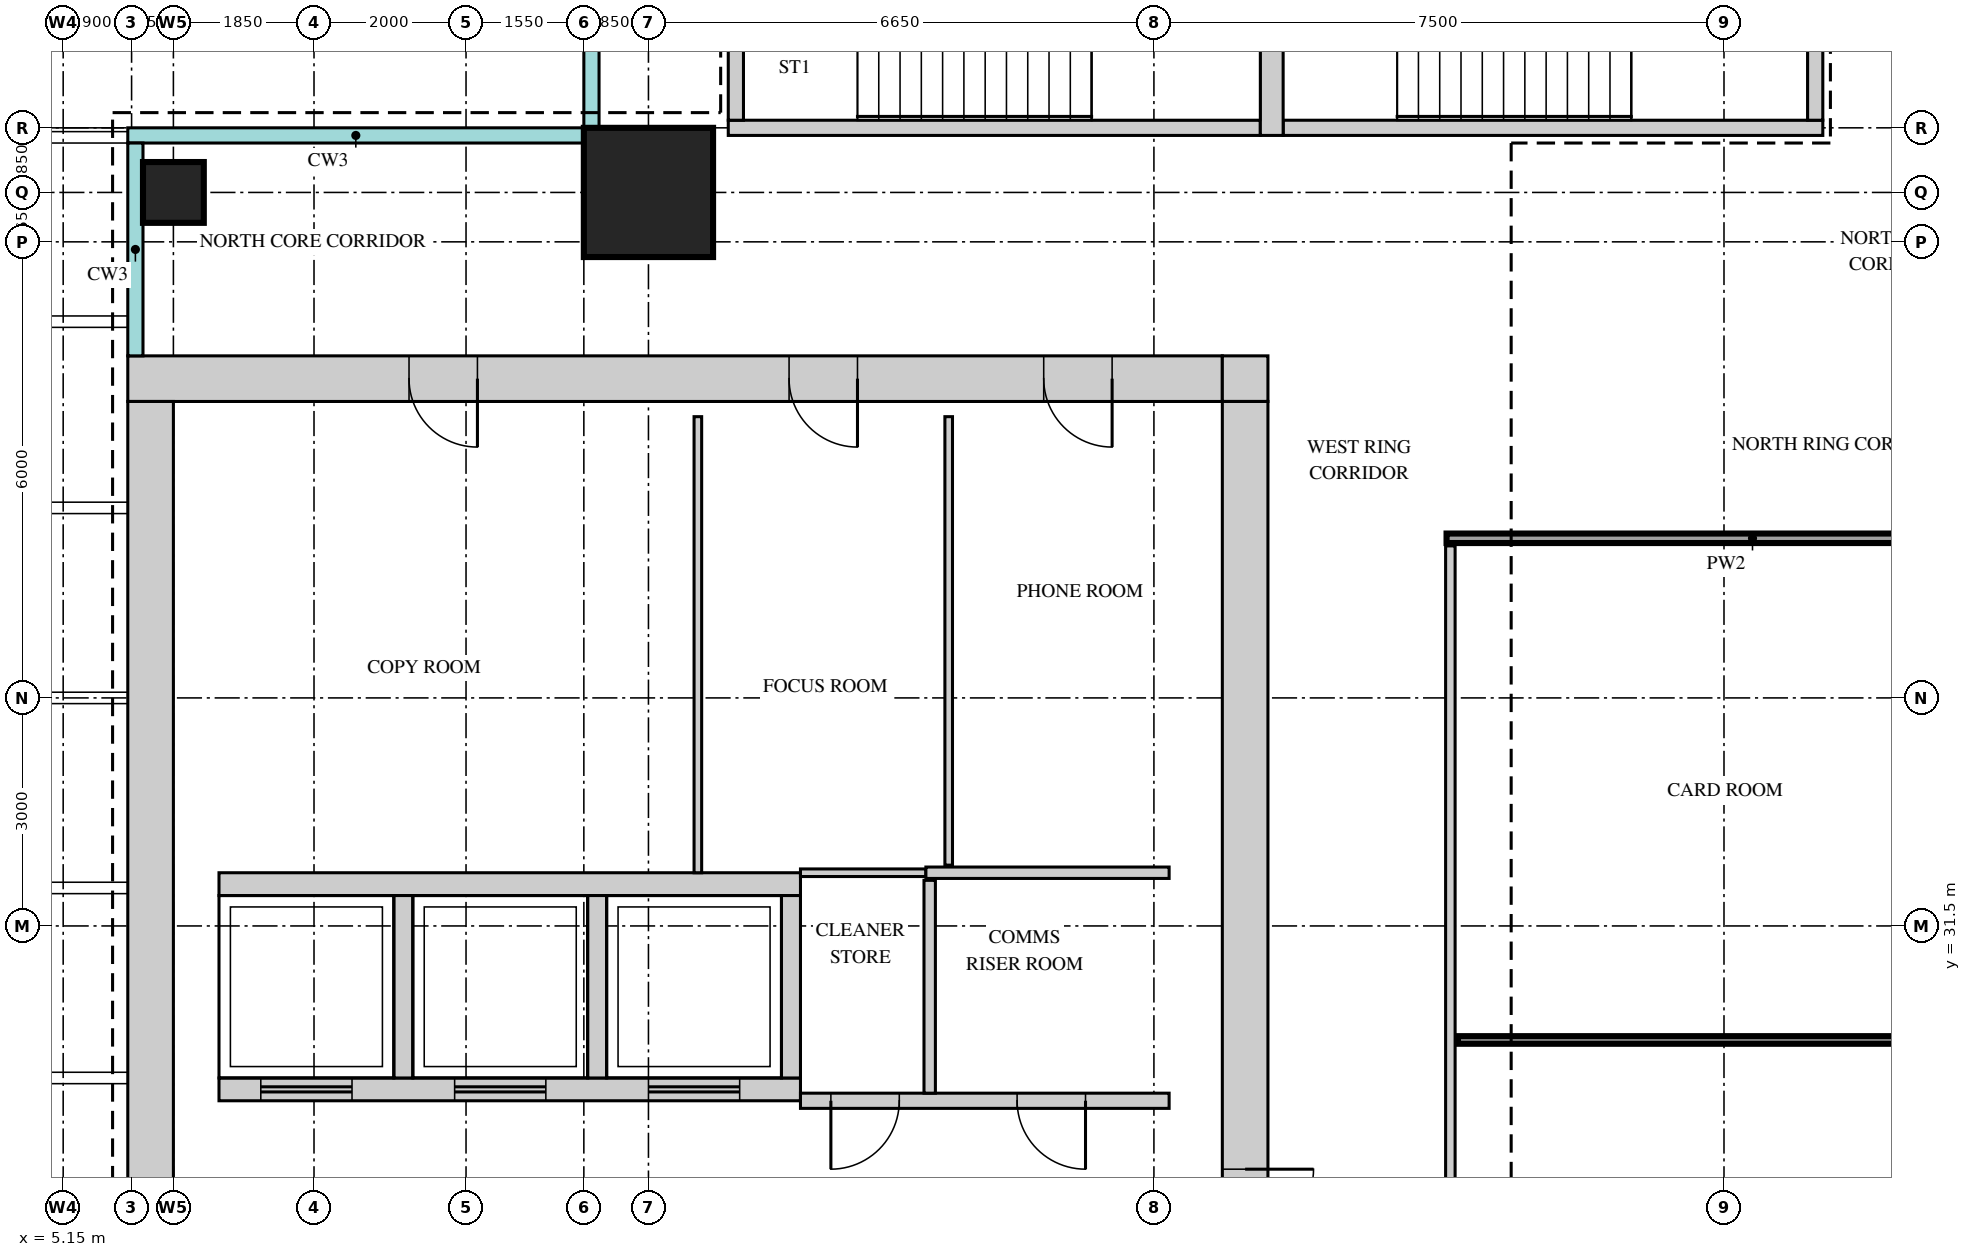
"""IFC4 building model, lengths in metres.
Left out: names, types, materials, properties, quantities, classifications, styles, units other than length and angle.
Written with IfcOpenShell. Run it as: python <this file> out.ifc"""

import sys

from ifc_helpers import new_model, si_unit, direction, frame, frame_2d, origin, origin_2d, place, context, subcontext, project, spatial, rectangle, extrude, source, transform, mapped, element, fill, save


model = new_model("IFC4")
c1 = context("Model", 3, precision=1e-05, world=origin(), true_north=direction((0.0, 1.0)))
c2 = subcontext(c1, "Body", "Model", "MODEL_VIEW")
j1 = project(units=[si_unit("LENGTHUNIT", "METRE"), si_unit("PLANEANGLEUNIT", "RADIAN")], contexts=[c1])
p1 = place(None, origin())
s1 = spatial("IfcSite", under=j1, at=p1, CompositionType="ELEMENT")
p2 = place(p1, origin())
s2 = spatial("IfcBuilding", under=s1, at=p2, CompositionType="ELEMENT")
p3 = place(p2, frame((0.0, 0.0, 294.2)))
s3 = spatial("IfcBuildingStorey", under=s2, at=p3, CompositionType="ELEMENT", Elevation=294.2)
m1 = source(origin(), c2, "Body", "SweptSolid", [
    extrude(rectangle(XDim=14.4, YDim=0.6, at=frame_2d((7.2, 0.0))), origin(), (0.0, 0.0, 1.0), 3.75),
])
p4 = place(p3, frame((6.0, 38.7, 0.0), z_axis=(0.0, 0.0, 1.0), x_axis=(1.0, 0.0, 0.0)))
e1 = element("IfcWall", 1, at=p4, inside=s3, PredefinedType="SHEAR", context=c2, shape_type="MappedRepresentation", body=[
    mapped(m1, transform((0.0, 0.0, 0.0))),
])
m2 = source(origin(), c2, "Body", "SweptSolid", [
    extrude(rectangle(XDim=0.9, YDim=2.1, at=frame_2d((0.45, 1.05))), frame((0.0, 0.31, 0.0), z_axis=(0.0, -1.0, 0.0), x_axis=(1.0, 0.0, 0.0)), (0.0, 0.0, 1.0), 0.62),
])
p5 = place(p4, frame((3.7, 0.0, 0.0)))
e2 = element("IfcOpeningElement", 2, at=p5, cuts=e1, PredefinedType="OPENING", context=c2, shape_type="MappedRepresentation", body=[
    mapped(m2, transform((0.0, 0.0, 0.0))),
])
p6 = place(p4, frame((8.7, 0.0, 0.0)))
e3 = element("IfcOpeningElement", 3, at=p6, cuts=e1, PredefinedType="OPENING", context=c2, shape_type="MappedRepresentation", body=[
    mapped(m2, transform((0.0, 0.0, 0.0))),
])
p7 = place(p4, frame((12.05, 0.0, 0.0)))
e4 = element("IfcOpeningElement", 4, at=p7, cuts=e1, PredefinedType="OPENING", context=c2, shape_type="MappedRepresentation", body=[
    mapped(m2, transform((0.0, 0.0, 0.0))),
])
m3 = source(origin(), c2, "Body", "SweptSolid", [
    extrude(rectangle(XDim=0.6, YDim=0.6, at=frame_2d((0.3, 0.0))), origin(), (0.0, 0.0, 1.0), 3.75),
])
p8 = place(p3, frame((20.4, 38.7, 0.0), z_axis=(0.0, 0.0, 1.0), x_axis=(1.0, 0.0, 0.0)))
e5 = element("IfcWall", 5, at=p8, inside=s3, PredefinedType="SHEAR", context=c2, shape_type="MappedRepresentation", body=[
    mapped(m3, transform((0.0, 0.0, 0.0))),
])
m4 = source(origin(), c2, "Body", "SweptSolid", [
    extrude(rectangle(XDim=22.8, YDim=0.6, at=frame_2d((11.4, 0.0))), origin(), (0.0, 0.0, 1.0), 3.75),
])
p9 = place(p3, frame((20.7, 15.6, 0.0), z_axis=(0.0, 0.0, 1.0), x_axis=(0.0, 1.0, 0.0)))
e6 = element("IfcWall", 6, at=p9, inside=s3, PredefinedType="SHEAR", context=c2, shape_type="MappedRepresentation", body=[
    mapped(m4, transform((0.0, 0.0, 0.0))),
])
m5 = source(origin(), c2, "Body", "SweptSolid", [
    extrude(rectangle(XDim=1.8, YDim=2.1, at=frame_2d((0.9, 1.05))), frame((0.0, 0.31, 0.0), z_axis=(0.0, -1.0, 0.0), x_axis=(1.0, 0.0, 0.0)), (0.0, 0.0, 1.0), 0.62),
])
p10 = place(p9, frame((10.9, 0.0, 0.0)))
e7 = element("IfcOpeningElement", 7, at=p10, cuts=e6, PredefinedType="OPENING", context=c2, shape_type="MappedRepresentation", body=[
    mapped(m5, transform((0.0, 0.0, 0.0))),
])
p11 = place(p9, frame((0.55, 0.0, 0.0)))
e8 = element("IfcOpeningElement", 8, at=p11, cuts=e6, PredefinedType="OPENING", context=c2, shape_type="MappedRepresentation", body=[
    mapped(m2, transform((0.0, 0.0, 0.0))),
])
p12 = place(p9, frame((4.1, 0.0, 0.0)))
e9 = element("IfcOpeningElement", 9, at=p12, cuts=e6, PredefinedType="OPENING", context=c2, shape_type="MappedRepresentation", body=[
    mapped(m2, transform((0.0, 0.0, 0.0))),
])
p13 = place(p3, frame((6.3, 15.6, 0.0), z_axis=(0.0, 0.0, 1.0), x_axis=(0.0, 1.0, 0.0)))
e10 = element("IfcWall", 10, at=p13, inside=s3, PredefinedType="SHEAR", context=c2, shape_type="MappedRepresentation", body=[
    mapped(m4, transform((0.0, 0.0, 0.0))),
])
m6 = source(origin(), c2, "Body", "SweptSolid", [
    extrude(rectangle(XDim=7.0, YDim=0.2, at=frame_2d((3.5, 0.0))), origin(), (0.0, 0.0, 1.0), 3.75),
])
p14 = place(p3, frame((13.9, 42.0, 0.0), z_axis=(0.0, 0.0, 1.0), x_axis=(1.0, 0.0, 0.0)))
e11 = element("IfcWall", 11, at=p14, inside=s3, PredefinedType="SHEAR", context=c2, shape_type="MappedRepresentation", body=[
    mapped(m6, transform((0.0, 0.0, 0.0))),
])
m7 = source(origin(), c2, "Body", "SweptSolid", [
    extrude(rectangle(XDim=7.1, YDim=0.2, at=frame_2d((3.55, 0.0))), origin(), (0.0, 0.0, 1.0), 3.75),
])
p15 = place(p3, frame((21.2, 42.0, 0.0), z_axis=(0.0, 0.0, 1.0), x_axis=(1.0, 0.0, 0.0)))
e12 = element("IfcWall", 12, at=p15, inside=s3, PredefinedType="SHEAR", context=c2, shape_type="MappedRepresentation", body=[
    mapped(m7, transform((0.0, 0.0, 0.0))),
])
m8 = source(origin(), c2, "Body", "SweptSolid", [
    extrude(rectangle(XDim=3.75, YDim=0.3, at=frame_2d((1.875, 0.0))), origin(), (0.0, 0.0, 1.0), 3.75),
])
p16 = place(p3, frame((21.05, 41.9, 0.0), z_axis=(0.0, 0.0, 1.0), x_axis=(0.0, 1.0, 0.0)))
e13 = element("IfcWall", 13, at=p16, inside=s3, PredefinedType="SHEAR", context=c2, shape_type="MappedRepresentation", body=[
    mapped(m8, transform((0.0, 0.0, 0.0))),
])
m9 = source(origin(), c2, "Body", "SweptSolid", [
    extrude(rectangle(XDim=3.35, YDim=0.2, at=frame_2d((1.675, 0.0))), origin(), (0.0, 0.0, 1.0), 3.75),
])
for number, where, z_axis, x_axis in (
    (14, (14.0, 42.1, 0.0), (0.0, 0.0, 1.0), (0.0, 1.0, 0.0)),
    (15, (28.2, 42.1, 0.0), (0.0, 0.0, 1.0), (0.0, 1.0, 0.0)),
):
    element("IfcWall", number, at=place(p3, frame(where, z_axis=z_axis, x_axis=x_axis)), inside=s3, PredefinedType="SHEAR", context=c2, shape_type="MappedRepresentation", body=[
        mapped(m9, transform((0.0, 0.0, 0.0))),
    ])
m10 = source(origin(), c2, "Body", "SweptSolid", [
    extrude(rectangle(XDim=7.65, YDim=0.3, at=frame_2d((3.825, 0.0))), origin(), (0.0, 0.0, 1.0), 3.75),
])
p17 = place(p3, frame((7.2, 32.05, 0.0), z_axis=(0.0, 0.0, 1.0), x_axis=(1.0, 0.0, 0.0)))
e16 = element("IfcWall", 16, at=p17, inside=s3, PredefinedType="STANDARD", context=c2, shape_type="MappedRepresentation", body=[
    mapped(m10, transform((0.0, 0.0, 0.0))),
])
p18 = place(p3, frame((7.2, 29.35, 0.0), z_axis=(0.0, 0.0, 1.0), x_axis=(1.0, 0.0, 0.0)))
e17 = element("IfcWall", 17, at=p18, inside=s3, PredefinedType="STANDARD", context=c2, shape_type="MappedRepresentation", body=[
    mapped(m10, transform((0.0, 0.0, 0.0))),
])
m11 = source(origin(), c2, "Body", "SweptSolid", [
    extrude(rectangle(XDim=1.2, YDim=2.1, at=frame_2d((0.6, 1.05))), frame((0.0, 0.16, 0.0), z_axis=(0.0, -1.0, 0.0), x_axis=(1.0, 0.0, 0.0)), (0.0, 0.0, 1.0), 0.32),
])
p19 = place(p18, frame((0.55, 0.0, 0.0)))
e18 = element("IfcOpeningElement", 18, at=p19, cuts=e17, PredefinedType="OPENING", context=c2, shape_type="MappedRepresentation", body=[
    mapped(m11, transform((0.0, 0.0, 0.0))),
])
p20 = place(p18, frame((3.1, 0.0, 0.0)))
e19 = element("IfcOpeningElement", 19, at=p20, cuts=e17, PredefinedType="OPENING", context=c2, shape_type="MappedRepresentation", body=[
    mapped(m11, transform((0.0, 0.0, 0.0))),
])
p21 = place(p18, frame((5.65, 0.0, 0.0)))
e20 = element("IfcOpeningElement", 20, at=p21, cuts=e17, PredefinedType="OPENING", context=c2, shape_type="MappedRepresentation", body=[
    mapped(m11, transform((0.0, 0.0, 0.0))),
])
m12 = source(origin(), c2, "Body", "SweptSolid", [
    extrude(rectangle(XDim=2.4, YDim=0.25, at=frame_2d((1.2, 0.0))), origin(), (0.0, 0.0, 1.0), 3.75),
])
for number, where, z_axis, x_axis in (
    (21, (9.625, 29.5, 0.0), (0.0, 0.0, 1.0), (0.0, 1.0, 0.0)),
    (22, (12.175, 29.5, 0.0), (0.0, 0.0, 1.0), (0.0, 1.0, 0.0)),
    (23, (14.725, 29.5, 0.0), (0.0, 0.0, 1.0), (0.0, 1.0, 0.0)),
):
    element("IfcWall", number, at=place(p3, frame(where, z_axis=z_axis, x_axis=x_axis)), inside=s3, PredefinedType="STANDARD", context=c2, shape_type="MappedRepresentation", body=[
        mapped(m12, transform((0.0, 0.0, 0.0))),
    ])
m13 = source(origin(), c2, "Body", "SweptSolid", [
    extrude(rectangle(XDim=1.7, YDim=1.7, at=origin_2d()), origin(), (0.0, 0.0, 1.0), 3.75),
])
p22 = place(p3, frame((12.85, 41.15, 0.0), z_axis=(0.0, 0.0, 1.0), x_axis=(1.0, 0.0, 0.0)))
e24 = element("IfcColumn", 24, at=p22, inside=s3, PredefinedType="COLUMN", context=c2, shape_type="MappedRepresentation", body=[
    mapped(m13, transform((0.0, 0.0, 0.0))),
])
m14 = source(origin(), c2, "Body", "SweptSolid", [
    extrude(rectangle(XDim=0.8, YDim=0.8, at=origin_2d()), origin(), (0.0, 0.0, 1.0), 3.75),
])
p23 = place(p3, frame((6.6, 41.15, 0.0), z_axis=(0.0, 0.0, 1.0), x_axis=(1.0, 0.0, 0.0)))
e25 = element("IfcColumn", 25, at=p23, inside=s3, PredefinedType="COLUMN", context=c2, shape_type="MappedRepresentation", body=[
    mapped(m14, transform((0.0, 0.0, 0.0))),
])
m15 = source(origin(), c2, "Body", "SweptSolid", [
    extrude(rectangle(XDim=19.0, YDim=0.125, at=frame_2d((9.5, 0.0))), origin(), (0.0, 0.0, 1.0), 3.8),
])
p24 = place(p3, frame((23.4, 17.5, 0.0), z_axis=(0.0, 0.0, 1.0), x_axis=(0.0, 1.0, 0.0)))
e26 = element("IfcWall", 26, at=p24, inside=s3, PredefinedType="PARTITIONING", context=c2, shape_type="MappedRepresentation", body=[
    mapped(m15, transform((0.0, 0.0, 0.0))),
])
m16 = source(origin(), c2, "Body", "SweptSolid", [
    extrude(rectangle(XDim=0.9, YDim=2.1, at=frame_2d((0.45, 1.05))), frame((0.0, 0.073, 0.0), z_axis=(0.0, -1.0, 0.0), x_axis=(1.0, 0.0, 0.0)), (0.0, 0.0, 1.0), 0.145),
])
p25 = place(p24, frame((8.4, 0.0, 0.0)))
e27 = element("IfcOpeningElement", 27, at=p25, cuts=e26, PredefinedType="OPENING", context=c2, shape_type="MappedRepresentation", body=[
    mapped(m16, transform((0.0, 0.0, 0.0))),
])
m17 = source(origin(), c2, "Body", "SweptSolid", [
    extrude(rectangle(XDim=4.85, YDim=0.2, at=frame_2d((2.425, 0.0))), origin(), (0.0, 0.0, 1.0), 3.8),
])
p26 = place(p3, frame((14.85, 29.2, 0.0), z_axis=(0.0, 0.0, 1.0), x_axis=(1.0, 0.0, 0.0)))
e28 = element("IfcWall", 28, at=p26, inside=s3, PredefinedType="PARTITIONING", context=c2, shape_type="MappedRepresentation", body=[
    mapped(m17, transform((0.0, 0.0, 0.0))),
])
m18 = source(origin(), c2, "Body", "SweptSolid", [
    extrude(rectangle(XDim=0.9, YDim=2.1, at=frame_2d((0.45, 1.05))), frame((0.0, 0.11, 0.0), z_axis=(0.0, -1.0, 0.0), x_axis=(1.0, 0.0, 0.0)), (0.0, 0.0, 1.0), 0.22),
])
p27 = place(p26, frame((0.4, 0.0, 0.0)))
e29 = element("IfcOpeningElement", 29, at=p27, cuts=e28, PredefinedType="OPENING", context=c2, shape_type="MappedRepresentation", body=[
    mapped(m18, transform((0.0, 0.0, 0.0))),
])
p28 = place(p26, frame((2.85, 0.0, 0.0)))
e30 = element("IfcOpeningElement", 30, at=p28, cuts=e28, PredefinedType="OPENING", context=c2, shape_type="MappedRepresentation", body=[
    mapped(m18, transform((0.0, 0.0, 0.0))),
])
m19 = source(origin(), c2, "Body", "SweptSolid", [
    extrude(rectangle(XDim=2.8, YDim=0.15, at=frame_2d((1.4, 0.0))), origin(), (0.0, 0.0, 1.0), 3.8),
])
p29 = place(p3, frame((16.55, 29.3, 0.0), z_axis=(0.0, 0.0, 1.0), x_axis=(0.0, 1.0, 0.0)))
e31 = element("IfcWall", 31, at=p29, inside=s3, PredefinedType="PARTITIONING", context=c2, shape_type="MappedRepresentation", body=[
    mapped(m19, transform((0.0, 0.0, 0.0))),
])
m20 = source(origin(), c2, "Body", "SweptSolid", [
    extrude(rectangle(XDim=16.4, YDim=0.1, at=frame_2d((8.2, 0.0))), origin(), (0.0, 0.0, 1.0), 3.8),
])
p30 = place(p3, frame((23.5, 30.0, 0.0), z_axis=(0.0, 0.0, 1.0), x_axis=(1.0, 0.0, 0.0)))
e32 = element("IfcWall", 32, at=p30, inside=s3, PredefinedType="PARTITIONING", context=c2, shape_type="MappedRepresentation", body=[
    mapped(m20, transform((0.0, 0.0, 0.0))),
])
m21 = source(origin(), c2, "Body", "SweptSolid", [
    extrude(rectangle(XDim=6.0, YDim=0.1, at=frame_2d((3.0, 0.0))), origin(), (0.0, 0.0, 1.0), 3.8),
])
p31 = place(p3, frame((13.5, 32.2, 0.0), z_axis=(0.0, 0.0, 1.0), x_axis=(0.0, 1.0, 0.0)))
e33 = element("IfcWall", 33, at=p31, inside=s3, PredefinedType="PARTITIONING", context=c2, shape_type="MappedRepresentation", body=[
    mapped(m21, transform((0.0, 0.0, 0.0))),
])
m22 = source(origin(), c2, "Body", "SweptSolid", [
    extrude(rectangle(XDim=1.65, YDim=0.1, at=frame_2d((0.825, 0.0))), origin(), (0.0, 0.0, 1.0), 3.8),
])
p32 = place(p3, frame((14.85, 32.2, 0.0), z_axis=(0.0, 0.0, 1.0), x_axis=(1.0, 0.0, 0.0)))
e34 = element("IfcWall", 34, at=p32, inside=s3, PredefinedType="PARTITIONING", context=c2, shape_type="MappedRepresentation", body=[
    mapped(m22, transform((0.0, 0.0, 0.0))),
])
m23 = source(origin(), c2, "Body", "SweptSolid", [
    extrude(rectangle(XDim=3.2, YDim=0.15, at=frame_2d((1.6, 0.0))), origin(), (0.0, 0.0, 1.0), 3.8),
])
p33 = place(p3, frame((16.5, 32.2, 0.0), z_axis=(0.0, 0.0, 1.0), x_axis=(1.0, 0.0, 0.0)))
e35 = element("IfcWall", 35, at=p33, inside=s3, PredefinedType="PARTITIONING", context=c2, shape_type="MappedRepresentation", body=[
    mapped(m23, transform((0.0, 0.0, 0.0))),
])
m24 = source(origin(), c2, "Body", "SweptSolid", [
    extrude(rectangle(XDim=5.9, YDim=0.1, at=frame_2d((2.95, 0.0))), origin(), (0.0, 0.0, 1.0), 3.8),
])
p34 = place(p3, frame((16.8, 32.3, 0.0), z_axis=(0.0, 0.0, 1.0), x_axis=(0.0, 1.0, 0.0)))
e36 = element("IfcWall", 36, at=p34, inside=s3, PredefinedType="PARTITIONING", context=c2, shape_type="MappedRepresentation", body=[
    mapped(m24, transform((0.0, 0.0, 0.0))),
])
m25 = source(origin(), c2, "Body", "SweptSolid", [
    extrude(rectangle(XDim=16.7, YDim=0.125, at=frame_2d((8.35, 0.0))), origin(), (0.0, 0.0, 1.0), 3.8),
])
p35 = place(p3, frame((23.35, 36.6, 0.0), z_axis=(0.0, 0.0, 1.0), x_axis=(1.0, 0.0, 0.0)))
e37 = element("IfcWall", 37, at=p35, inside=s3, PredefinedType="PARTITIONING", context=c2, shape_type="MappedRepresentation", body=[
    mapped(m25, transform((0.0, 0.0, 0.0))),
])
p36 = place(p35, frame((8.05, 0.0, 0.0)))
e38 = element("IfcOpeningElement", 38, at=p36, cuts=e37, PredefinedType="OPENING", context=c2, shape_type="MappedRepresentation", body=[
    mapped(m16, transform((0.0, 0.0, 0.0))),
])
m26 = source(origin(), c2, "Body", "SweptSolid", [
    extrude(rectangle(XDim=0.9, YDim=2.1, at=frame_2d((0.45, 1.05))), frame((0.0, 0.025, 0.0), z_axis=(0.0, -1.0, 0.0), x_axis=(1.0, 0.0, 0.0)), (0.0, 0.0, 1.0), 0.05),
])
p37 = place(p27, origin())
e39 = element("IfcDoor", 39, at=p37, inside=s3, OperationType="SINGLE_SWING_LEFT", PredefinedType="DOOR", context=c2, shape_type="MappedRepresentation", body=[
    mapped(m26, transform((0.0, 0.0, 0.0))),
])
fill(e29, e39)
p38 = place(p28, origin())
e40 = element("IfcDoor", 40, at=p38, inside=s3, OperationType="SINGLE_SWING_RIGHT", PredefinedType="DOOR", context=c2, shape_type="MappedRepresentation", body=[
    mapped(m26, transform((0.0, 0.0, 0.0))),
])
fill(e30, e40)
m27 = source(origin(), c2, "Body", "SweptSolid", [
    extrude(rectangle(XDim=1.8, YDim=2.1, at=frame_2d((0.9, 1.05))), frame((0.0, 0.25, 0.0), z_axis=(0.0, -1.0, 0.0), x_axis=(1.0, 0.0, 0.0)), (0.0, 0.0, 1.0), 0.5),
])
p39 = place(p10, origin())
e41 = element("IfcDoor", 41, at=p39, inside=s3, OperationType="DOUBLE_DOOR_SINGLE_SWING", PredefinedType="DOOR", context=c2, shape_type="MappedRepresentation", body=[
    mapped(m27, transform((0.0, 0.0, 0.0))),
])
fill(e7, e41)
m28 = source(origin(), c2, "Body", "SweptSolid", [
    extrude(rectangle(XDim=0.9, YDim=2.1, at=frame_2d((0.45, 1.05))), frame((0.0, 0.25, 0.0), z_axis=(0.0, -1.0, 0.0), x_axis=(1.0, 0.0, 0.0)), (0.0, 0.0, 1.0), 0.5),
])
p40 = place(p5, origin())
e42 = element("IfcDoor", 42, at=p40, inside=s3, OperationType="SINGLE_SWING_RIGHT", PredefinedType="DOOR", context=c2, shape_type="MappedRepresentation", body=[
    mapped(m28, transform((0.0, 0.0, 0.0))),
])
fill(e2, e42)
p41 = place(p6, origin())
e43 = element("IfcDoor", 43, at=p41, inside=s3, OperationType="SINGLE_SWING_RIGHT", PredefinedType="DOOR", context=c2, shape_type="MappedRepresentation", body=[
    mapped(m28, transform((0.0, 0.0, 0.0))),
])
fill(e3, e43)
p42 = place(p7, origin())
e44 = element("IfcDoor", 44, at=p42, inside=s3, OperationType="SINGLE_SWING_RIGHT", PredefinedType="DOOR", context=c2, shape_type="MappedRepresentation", body=[
    mapped(m28, transform((0.0, 0.0, 0.0))),
])
fill(e4, e44)
m29 = source(origin(), c2, "Body", "SweptSolid", [
    extrude(rectangle(XDim=1.2, YDim=2.1, at=frame_2d((0.6, 1.05))), frame((0.0, 0.025, 0.0), z_axis=(0.0, -1.0, 0.0), x_axis=(1.0, 0.0, 0.0)), (0.0, 0.0, 1.0), 0.05),
])
p43 = place(p19, origin())
e45 = element("IfcDoor", 45, at=p43, inside=s3, OperationType="DOUBLE_DOOR_SLIDING", PredefinedType="DOOR", context=c2, shape_type="MappedRepresentation", body=[
    mapped(m29, transform((0.0, 0.0, 0.0))),
])
fill(e18, e45)
p44 = place(p20, origin())
e46 = element("IfcDoor", 46, at=p44, inside=s3, OperationType="DOUBLE_DOOR_SLIDING", PredefinedType="DOOR", context=c2, shape_type="MappedRepresentation", body=[
    mapped(m29, transform((0.0, 0.0, 0.0))),
])
fill(e19, e46)
p45 = place(p21, origin())
e47 = element("IfcDoor", 47, at=p45, inside=s3, OperationType="DOUBLE_DOOR_SLIDING", PredefinedType="DOOR", context=c2, shape_type="MappedRepresentation", body=[
    mapped(m29, transform((0.0, 0.0, 0.0))),
])
fill(e20, e47)
save(model, sys.argv[1])
